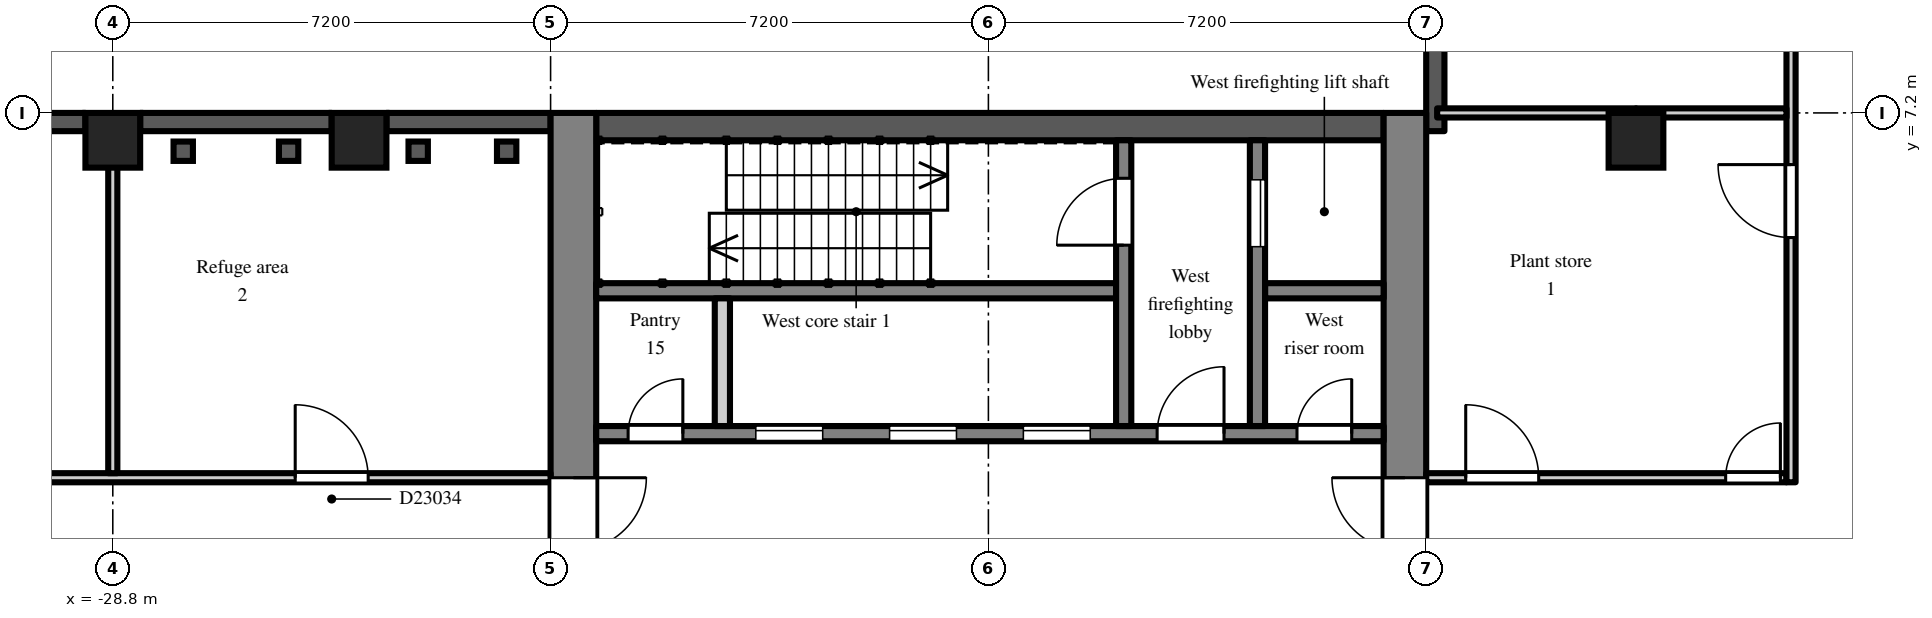
"""IFC4 building model, lengths in metres.
Left out: names, types, materials, properties, quantities, classifications, styles, units other than length and angle.
Written with IfcOpenShell. Run it as: python <this file> out.ifc"""

import sys

from ifc_helpers import new_model, si_unit, direction, frame, frame_2d, origin, origin_2d, place, context, subcontext, project, spatial, rectangle, extrude, element, fill, save


model = new_model("IFC4")
c1 = context("Model", 3, precision=1e-05, world=origin(), true_north=direction((0.0, 1.0)))
c2 = subcontext(c1, "Body", "Model", "MODEL_VIEW")
j1 = project(units=[si_unit("LENGTHUNIT", "METRE"), si_unit("PLANEANGLEUNIT", "RADIAN")], contexts=[c1])
p1 = place(None, origin())
s1 = spatial("IfcSite", under=j1, at=p1, CompositionType="ELEMENT")
p2 = place(p1, origin())
s2 = spatial("IfcBuilding", under=s1, at=p2, CompositionType="ELEMENT")
p3 = place(p2, frame((0.0, 0.0, 162.3)))
s3 = spatial("IfcBuildingStorey", under=s2, at=p3, CompositionType="ELEMENT", Elevation=162.3)
for number, where, z_axis, x_axis in (
    (1, (-28.8, 6.75, 0.0), (0.0, 0.0, 1.0), (1.0, 0.0, 0.0)),
    (2, (-24.75, 6.75, 0.0), (0.0, 0.0, 1.0), (1.0, 0.0, 0.0)),
    (3, (-3.75, 6.75, 0.0), (0.0, 0.0, 1.0), (1.0, 0.0, 0.0)),
):
    element("IfcColumn", number, at=place(p3, frame(where, z_axis=z_axis, x_axis=x_axis)), inside=s3, PredefinedType="COLUMN", context=c2, shape_type="SweptSolid", body=[
        extrude(rectangle(XDim=0.9, YDim=0.9, at=origin_2d()), origin(), (0.0, 0.0, 1.0), 4.2),
    ])
p4 = place(p3, frame((-7.05, 14.4, 0.0), z_axis=(0.0, 0.0, 1.0), x_axis=(0.0, -1.0, 0.0)))
e4 = element("IfcWall", 4, at=p4, inside=s3, PredefinedType="SOLIDWALL", context=c2, shape_type="SweptSolid", body=[
    extrude(rectangle(XDim=7.5, YDim=0.3, at=frame_2d((3.75, 0.0))), origin(), (0.0, 0.0, 1.0), 3.8),
])
p5 = place(p3, frame((-21.6, 7.05, 0.0), z_axis=(0.0, 0.0, 1.0), x_axis=(-1.0, 0.0, 0.0)))
e5 = element("IfcWall", 5, at=p5, inside=s3, PredefinedType="SOLIDWALL", context=c2, shape_type="SweptSolid", body=[
    extrude(rectangle(XDim=2.7, YDim=0.3, at=frame_2d((1.35, 0.0))), origin(), (0.0, 0.0, 1.0), 3.4),
])
p6 = place(p3, frame((-25.2, 7.05, 0.0), z_axis=(0.0, 0.0, 1.0), x_axis=(-1.0, 0.0, 0.0)))
e6 = element("IfcWall", 6, at=p6, inside=s3, PredefinedType="SOLIDWALL", context=c2, shape_type="SweptSolid", body=[
    extrude(rectangle(XDim=3.15, YDim=0.3, at=frame_2d((1.575, 0.0))), origin(), (0.0, 0.0, 1.0), 3.4),
])
p7 = place(p3, frame((-29.25, 7.05, 0.0), z_axis=(0.0, 0.0, 1.0), x_axis=(-1.0, 0.0, 0.0)))
e7 = element("IfcWall", 7, at=p7, inside=s3, PredefinedType="SOLIDWALL", context=c2, shape_type="SweptSolid", body=[
    extrude(rectangle(XDim=6.3, YDim=0.3, at=frame_2d((3.15, 0.0))), origin(), (0.0, 0.0, 1.0), 3.4),
])
p8 = place(p3, frame((-7.55, -7.2, 0.0), z_axis=(0.0, 0.0, 1.0), x_axis=(0.0, 1.0, 0.0)))
e8 = element("IfcWall", 8, at=p8, inside=s3, PredefinedType="SHEAR", context=c2, shape_type="SweptSolid", body=[
    extrude(rectangle(XDim=14.4, YDim=0.7, at=frame_2d((7.2, 0.0))), origin(), (0.0, 0.0, 1.0), 3.8),
])
p9 = place(p8, frame((6.0, 0.0, 0.0)))
e9 = element("IfcOpeningElement", 9, at=p9, cuts=e8, PredefinedType="OPENING", context=c2, shape_type="SweptSolid", body=[
    extrude(rectangle(XDim=2.4, YDim=2.2, at=frame_2d((1.2, 1.1))), frame((0.0, 0.36, 0.0), z_axis=(0.0, -1.0, 0.0), x_axis=(1.0, 0.0, 0.0)), (0.0, 0.0, 1.0), 0.72),
])
p10 = place(p3, frame((-21.225, -7.2, 0.0), z_axis=(0.0, 0.0, 1.0), x_axis=(0.0, 1.0, 0.0)))
e10 = element("IfcWall", 10, at=p10, inside=s3, PredefinedType="SHEAR", context=c2, shape_type="SweptSolid", body=[
    extrude(rectangle(XDim=14.4, YDim=0.75, at=frame_2d((7.2, 0.0))), origin(), (0.0, 0.0, 1.0), 3.8),
])
p11 = place(p10, frame((6.0, 0.0, 0.0)))
e11 = element("IfcOpeningElement", 11, at=p11, cuts=e10, PredefinedType="OPENING", context=c2, shape_type="SweptSolid", body=[
    extrude(rectangle(XDim=2.4, YDim=2.2, at=frame_2d((1.2, 1.1))), frame((0.0, 0.385, 0.0), z_axis=(0.0, -1.0, 0.0), x_axis=(1.0, 0.0, 0.0)), (0.0, 0.0, 1.0), 0.77),
])
p12 = place(p3, frame((-7.9, 6.975, 0.0), z_axis=(0.0, 0.0, 1.0), x_axis=(-1.0, 0.0, 0.0)))
e12 = element("IfcWall", 12, at=p12, inside=s3, PredefinedType="SHEAR", context=c2, shape_type="SweptSolid", body=[
    extrude(rectangle(XDim=12.95, YDim=0.45, at=frame_2d((6.475, 0.0))), origin(), (0.0, 0.0, 1.0), 3.8),
])
p13 = place(p3, frame((-7.9, 1.925, 0.0), z_axis=(0.0, 0.0, 1.0), x_axis=(-1.0, 0.0, 0.0)))
e13 = element("IfcWall", 13, at=p13, inside=s3, PredefinedType="SHEAR", context=c2, shape_type="SweptSolid", body=[
    extrude(rectangle(XDim=12.95, YDim=0.25, at=frame_2d((6.475, 0.0))), origin(), (0.0, 0.0, 1.0), 3.8),
])
p14 = place(p13, frame((4.825, 0.0, 0.0)))
e14 = element("IfcOpeningElement", 14, at=p14, cuts=e13, PredefinedType="OPENING", context=c2, shape_type="SweptSolid", body=[
    extrude(rectangle(XDim=1.1, YDim=2.1, at=frame_2d((0.55, 1.05))), frame((0.0, 0.135, 0.0), z_axis=(0.0, -1.0, 0.0), x_axis=(1.0, 0.0, 0.0)), (0.0, 0.0, 1.0), 0.27),
])
p15 = place(p13, frame((7.025, 0.0, 0.0)))
e15 = element("IfcOpeningElement", 15, at=p15, cuts=e13, PredefinedType="OPENING", context=c2, shape_type="SweptSolid", body=[
    extrude(rectangle(XDim=1.1, YDim=2.1, at=frame_2d((0.55, 1.05))), frame((0.0, 0.135, 0.0), z_axis=(0.0, -1.0, 0.0), x_axis=(1.0, 0.0, 0.0)), (0.0, 0.0, 1.0), 0.27),
])
p16 = place(p13, frame((9.225, 0.0, 0.0)))
e16 = element("IfcOpeningElement", 16, at=p16, cuts=e13, PredefinedType="OPENING", context=c2, shape_type="SweptSolid", body=[
    extrude(rectangle(XDim=1.1, YDim=2.1, at=frame_2d((0.55, 1.05))), frame((0.0, 0.135, 0.0), z_axis=(0.0, -1.0, 0.0), x_axis=(1.0, 0.0, 0.0)), (0.0, 0.0, 1.0), 0.27),
])
p17 = place(p13, frame((0.525, 0.0, 0.0)))
e17 = element("IfcOpeningElement", 17, at=p17, cuts=e13, PredefinedType="OPENING", context=c2, shape_type="SweptSolid", body=[
    extrude(rectangle(XDim=0.9, YDim=2.1, at=frame_2d((0.45, 1.05))), frame((0.0, 0.135, 0.0), z_axis=(0.0, -1.0, 0.0), x_axis=(1.0, 0.0, 0.0)), (0.0, 0.0, 1.0), 0.27),
])
p18 = place(p13, frame((2.625, 0.0, 0.0)))
e18 = element("IfcOpeningElement", 18, at=p18, cuts=e13, PredefinedType="OPENING", context=c2, shape_type="SweptSolid", body=[
    extrude(rectangle(XDim=1.1, YDim=2.1, at=frame_2d((0.55, 1.05))), frame((0.0, 0.135, 0.0), z_axis=(0.0, -1.0, 0.0), x_axis=(1.0, 0.0, 0.0)), (0.0, 0.0, 1.0), 0.27),
])
p19 = place(p13, frame((11.525, 0.0, 0.0)))
e19 = element("IfcOpeningElement", 19, at=p19, cuts=e13, PredefinedType="OPENING", context=c2, shape_type="SweptSolid", body=[
    extrude(rectangle(XDim=0.9, YDim=2.1, at=frame_2d((0.45, 1.05))), frame((0.0, 0.135, 0.0), z_axis=(0.0, -1.0, 0.0), x_axis=(1.0, 0.0, 0.0)), (0.0, 0.0, 1.0), 0.27),
])
p20 = place(p3, frame((-7.9, 4.275, 0.0), z_axis=(0.0, 0.0, 1.0), x_axis=(-1.0, 0.0, 0.0)))
e20 = element("IfcWall", 20, at=p20, inside=s3, PredefinedType="SHEAR", context=c2, shape_type="SweptSolid", body=[
    extrude(rectangle(XDim=1.95, YDim=0.25, at=frame_2d((0.975, 0.0))), origin(), (0.0, 0.0, 1.0), 3.8),
])
p21 = place(p3, frame((-12.3, 4.275, 0.0), z_axis=(0.0, 0.0, 1.0), x_axis=(-1.0, 0.0, 0.0)))
e21 = element("IfcWall", 21, at=p21, inside=s3, PredefinedType="SHEAR", context=c2, shape_type="SweptSolid", body=[
    extrude(rectangle(XDim=8.55, YDim=0.25, at=frame_2d((4.275, 0.0))), origin(), (0.0, 0.0, 1.0), 3.8),
])
p22 = place(p3, frame((-9.975, 2.05, 0.0), z_axis=(0.0, 0.0, 1.0), x_axis=(0.0, 1.0, 0.0)))
e22 = element("IfcWall", 22, at=p22, inside=s3, PredefinedType="SHEAR", context=c2, shape_type="SweptSolid", body=[
    extrude(rectangle(XDim=4.7, YDim=0.25, at=frame_2d((2.35, 0.0))), origin(), (0.0, 0.0, 1.0), 3.8),
])
p23 = place(p22, frame((2.95, 0.0, 0.0)))
e23 = element("IfcOpeningElement", 23, at=p23, cuts=e22, PredefinedType="OPENING", context=c2, shape_type="SweptSolid", body=[
    extrude(rectangle(XDim=1.1, YDim=2.1, at=frame_2d((0.55, 1.05))), frame((0.0, 0.135, 0.0), z_axis=(0.0, -1.0, 0.0), x_axis=(1.0, 0.0, 0.0)), (0.0, 0.0, 1.0), 0.27),
])
p24 = place(p3, frame((-12.175, 2.05, 0.0), z_axis=(0.0, 0.0, 1.0), x_axis=(0.0, 1.0, 0.0)))
e24 = element("IfcWall", 24, at=p24, inside=s3, PredefinedType="SHEAR", context=c2, shape_type="SweptSolid", body=[
    extrude(rectangle(XDim=4.7, YDim=0.25, at=frame_2d((2.35, 0.0))), origin(), (0.0, 0.0, 1.0), 3.8),
])
p25 = place(p24, frame((2.975, 0.0, 0.0)))
e25 = element("IfcOpeningElement", 25, at=p25, cuts=e24, PredefinedType="OPENING", context=c2, shape_type="SweptSolid", body=[
    extrude(rectangle(XDim=1.1, YDim=2.1, at=frame_2d((0.55, 1.05))), frame((0.0, 0.135, 0.0), z_axis=(0.0, -1.0, 0.0), x_axis=(1.0, 0.0, 0.0)), (0.0, 0.0, 1.0), 0.27),
])
p26 = place(p3, frame((-18.775, 2.05, 0.0), z_axis=(0.0, 0.0, 1.0), x_axis=(0.0, 1.0, 0.0)))
e26 = element("IfcWall", 26, at=p26, inside=s3, PredefinedType="PARTITIONING", context=c2, shape_type="SweptSolid", body=[
    extrude(rectangle(XDim=2.1, YDim=0.25, at=frame_2d((1.05, 0.0))), origin(), (0.0, 0.0, 1.0), 3.8),
])
p27 = place(p3, frame((-36.5, 1.2, 0.0), z_axis=(0.0, 0.0, 1.0), x_axis=(1.0, 0.0, 0.0)))
e27 = element("IfcWall", 27, at=p27, inside=s3, PredefinedType="PARTITIONING", context=c2, shape_type="SweptSolid", body=[
    extrude(rectangle(XDim=14.9, YDim=0.15, at=frame_2d((7.45, 0.0))), origin(), (0.0, 0.0, 1.0), 3.8),
])
p28 = place(p27, frame((10.7, 0.0, 0.0)))
e28 = element("IfcOpeningElement", 28, at=p28, cuts=e27, PredefinedType="OPENING", context=c2, shape_type="SweptSolid", body=[
    extrude(rectangle(XDim=1.2, YDim=2.1, at=frame_2d((0.6, 1.05))), frame((0.0, 0.085, 0.0), z_axis=(0.0, -1.0, 0.0), x_axis=(1.0, 0.0, 0.0)), (0.0, 0.0, 1.0), 0.17),
])
p29 = place(p27, frame((2.95, 0.0, 0.0)))
e29 = element("IfcOpeningElement", 29, at=p29, cuts=e27, PredefinedType="OPENING", context=c2, shape_type="SweptSolid", body=[
    extrude(rectangle(XDim=1.8, YDim=2.1, at=frame_2d((0.9, 1.05))), frame((0.0, 0.085, 0.0), z_axis=(0.0, -1.0, 0.0), x_axis=(1.0, 0.0, 0.0)), (0.0, 0.0, 1.0), 0.17),
])
p30 = place(p3, frame((-28.8, 1.275, 0.0), z_axis=(0.0, 0.0, 1.0), x_axis=(0.0, 1.0, 0.0)))
e30 = element("IfcWall", 30, at=p30, inside=s3, PredefinedType="PARTITIONING", context=c2, shape_type="SweptSolid", body=[
    extrude(rectangle(XDim=5.625, YDim=0.15, at=frame_2d((2.812, 0.0))), origin(), (0.0, 0.0, 1.0), 3.8),
])
p31 = place(p3, frame((-7.2, 1.2, 0.0), z_axis=(0.0, 0.0, 1.0), x_axis=(1.0, 0.0, 0.0)))
e31 = element("IfcWall", 31, at=p31, inside=s3, PredefinedType="PARTITIONING", context=c2, shape_type="SweptSolid", body=[
    extrude(rectangle(XDim=5.925, YDim=0.15, at=frame_2d((2.962, 0.0))), origin(), (0.0, 0.0, 1.0), 3.8),
])
p32 = place(p31, frame((0.65, 0.0, 0.0)))
e32 = element("IfcOpeningElement", 32, at=p32, cuts=e31, PredefinedType="OPENING", context=c2, shape_type="SweptSolid", body=[
    extrude(rectangle(XDim=1.2, YDim=2.1, at=frame_2d((0.6, 1.05))), frame((0.0, 0.085, 0.0), z_axis=(0.0, -1.0, 0.0), x_axis=(1.0, 0.0, 0.0)), (0.0, 0.0, 1.0), 0.17),
])
p33 = place(p31, frame((4.925, 0.0, 0.0)))
e33 = element("IfcOpeningElement", 33, at=p33, cuts=e31, PredefinedType="OPENING", context=c2, shape_type="SweptSolid", body=[
    extrude(rectangle(XDim=0.9, YDim=2.1, at=frame_2d((0.45, 1.05))), frame((0.0, 0.085, 0.0), z_axis=(0.0, -1.0, 0.0), x_axis=(1.0, 0.0, 0.0)), (0.0, 0.0, 1.0), 0.17),
])
p34 = place(p3, frame((-7.02, 7.2, 0.0), z_axis=(0.0, 0.0, 1.0), x_axis=(1.0, 0.0, 0.0)))
e34 = element("IfcWall", 34, at=p34, inside=s3, PredefinedType="PARTITIONING", context=c2, shape_type="SweptSolid", body=[
    extrude(rectangle(XDim=3.27, YDim=0.15, at=frame_2d((1.635, 0.0))), origin(), (0.0, 0.0, 1.0), 3.4),
])
p35 = place(p3, frame((-1.2, 1.125, 0.0), z_axis=(0.0, 0.0, 1.0), x_axis=(0.0, 1.0, 0.0)))
e35 = element("IfcWall", 35, at=p35, inside=s3, PredefinedType="PARTITIONING", context=c2, shape_type="SweptSolid", body=[
    extrude(rectangle(XDim=20.295, YDim=0.15, at=frame_2d((10.147, 0.0))), origin(), (0.0, 0.0, 1.0), 3.8),
])
p36 = place(p35, frame((4.025, 0.0, 0.0)))
e36 = element("IfcOpeningElement", 36, at=p36, cuts=e35, PredefinedType="OPENING", context=c2, shape_type="SweptSolid", body=[
    extrude(rectangle(XDim=1.2, YDim=2.1, at=frame_2d((0.6, 1.05))), frame((0.0, 0.085, 0.0), z_axis=(0.0, -1.0, 0.0), x_axis=(1.0, 0.0, 0.0)), (0.0, 0.0, 1.0), 0.17),
])
p37 = place(p35, frame((8.775, 0.0, 0.0)))
e37 = element("IfcOpeningElement", 37, at=p37, cuts=e35, PredefinedType="OPENING", context=c2, shape_type="SweptSolid", body=[
    extrude(rectangle(XDim=1.8, YDim=2.1, at=frame_2d((0.9, 1.05))), frame((0.0, 0.085, 0.0), z_axis=(0.0, -1.0, 0.0), x_axis=(1.0, 0.0, 0.0)), (0.0, 0.0, 1.0), 0.17),
])
p38 = place(p35, frame((15.825, 0.0, 0.0)))
e38 = element("IfcOpeningElement", 38, at=p38, cuts=e35, PredefinedType="OPENING", context=c2, shape_type="SweptSolid", body=[
    extrude(rectangle(XDim=1.8, YDim=2.1, at=frame_2d((0.9, 1.05))), frame((0.0, 0.085, 0.0), z_axis=(0.0, -1.0, 0.0), x_axis=(1.0, 0.0, 0.0)), (0.0, 0.0, 1.0), 0.17),
])
p39 = place(p35, frame((18.125, 0.0, 0.0)))
e39 = element("IfcOpeningElement", 39, at=p39, cuts=e35, PredefinedType="OPENING", context=c2, shape_type="SweptSolid", body=[
    extrude(rectangle(XDim=1.2, YDim=2.1, at=frame_2d((0.6, 1.05))), frame((0.0, 0.085, 0.0), z_axis=(0.0, -1.0, 0.0), x_axis=(1.0, 0.0, 0.0)), (0.0, 0.0, 1.0), 0.17),
])
p40 = place(p3, frame((-3.75, 7.2, 0.0), z_axis=(0.0, 0.0, 1.0), x_axis=(1.0, 0.0, 0.0)))
e40 = element("IfcWall", 40, at=p40, inside=s3, PredefinedType="PARTITIONING", context=c2, shape_type="SweptSolid", body=[
    extrude(rectangle(XDim=2.475, YDim=0.15, at=frame_2d((1.238, 0.0))), origin(), (0.0, 0.0, 1.0), 3.8),
])
p41 = place(p14, origin())
e41 = element("IfcDoor", 41, at=p41, inside=s3, OperationType="SLIDING_TO_LEFT", PredefinedType="DOOR", context=c2, shape_type="SweptSolid", body=[
    extrude(rectangle(XDim=1.1, YDim=2.1, at=frame_2d((0.55, 1.05))), frame((0.0, 0.025, 0.0), z_axis=(0.0, -1.0, 0.0), x_axis=(1.0, 0.0, 0.0)), (0.0, 0.0, 1.0), 0.05),
])
fill(e14, e41)
p42 = place(p15, origin())
e42 = element("IfcDoor", 42, at=p42, inside=s3, OperationType="SLIDING_TO_LEFT", PredefinedType="DOOR", context=c2, shape_type="SweptSolid", body=[
    extrude(rectangle(XDim=1.1, YDim=2.1, at=frame_2d((0.55, 1.05))), frame((0.0, 0.025, 0.0), z_axis=(0.0, -1.0, 0.0), x_axis=(1.0, 0.0, 0.0)), (0.0, 0.0, 1.0), 0.05),
])
fill(e15, e42)
p43 = place(p16, origin())
e43 = element("IfcDoor", 43, at=p43, inside=s3, OperationType="SLIDING_TO_LEFT", PredefinedType="DOOR", context=c2, shape_type="SweptSolid", body=[
    extrude(rectangle(XDim=1.1, YDim=2.1, at=frame_2d((0.55, 1.05))), frame((0.0, 0.025, 0.0), z_axis=(0.0, -1.0, 0.0), x_axis=(1.0, 0.0, 0.0)), (0.0, 0.0, 1.0), 0.05),
])
fill(e16, e43)
p44 = place(p23, origin())
e44 = element("IfcDoor", 44, at=p44, inside=s3, OperationType="SLIDING_TO_LEFT", PredefinedType="DOOR", context=c2, shape_type="SweptSolid", body=[
    extrude(rectangle(XDim=1.1, YDim=2.1, at=frame_2d((0.55, 1.05))), frame((0.0, 0.025, 0.0), z_axis=(0.0, -1.0, 0.0), x_axis=(1.0, 0.0, 0.0)), (0.0, 0.0, 1.0), 0.05),
])
fill(e23, e44)
p45 = place(p25, origin())
e45 = element("IfcDoor", 45, at=p45, inside=s3, OperationType="SINGLE_SWING_LEFT", PredefinedType="DOOR", context=c2, shape_type="SweptSolid", body=[
    extrude(rectangle(XDim=1.1, YDim=2.1, at=frame_2d((0.55, 1.05))), frame((0.0, 0.025, 0.0), z_axis=(0.0, -1.0, 0.0), x_axis=(1.0, 0.0, 0.0)), (0.0, 0.0, 1.0), 0.05),
])
fill(e25, e45)
p46 = place(p17, frame((0.9, 0.0, 0.0), z_axis=(0.0, 0.0, 1.0), x_axis=(-1.0, 0.0, 0.0)))
e46 = element("IfcDoor", 46, at=p46, inside=s3, OperationType="SINGLE_SWING_RIGHT", PredefinedType="DOOR", context=c2, shape_type="SweptSolid", body=[
    extrude(rectangle(XDim=0.9, YDim=2.1, at=frame_2d((0.45, 1.05))), frame((0.0, 0.025, 0.0), z_axis=(0.0, -1.0, 0.0), x_axis=(1.0, 0.0, 0.0)), (0.0, 0.0, 1.0), 0.05),
])
fill(e17, e46)
p47 = place(p18, frame((1.1, 0.0, 0.0), z_axis=(0.0, 0.0, 1.0), x_axis=(-1.0, 0.0, 0.0)))
e47 = element("IfcDoor", 47, at=p47, inside=s3, OperationType="SINGLE_SWING_RIGHT", PredefinedType="DOOR", context=c2, shape_type="SweptSolid", body=[
    extrude(rectangle(XDim=1.1, YDim=2.1, at=frame_2d((0.55, 1.05))), frame((0.0, 0.025, 0.0), z_axis=(0.0, -1.0, 0.0), x_axis=(1.0, 0.0, 0.0)), (0.0, 0.0, 1.0), 0.05),
])
fill(e18, e47)
p48 = place(p9, origin())
e48 = element("IfcDoor", 48, at=p48, inside=s3, OperationType="DOUBLE_DOOR_DOUBLE_SWING", PredefinedType="DOOR", context=c2, shape_type="SweptSolid", body=[
    extrude(rectangle(XDim=2.4, YDim=2.2, at=frame_2d((1.2, 1.1))), frame((0.0, 0.025, 0.0), z_axis=(0.0, -1.0, 0.0), x_axis=(1.0, 0.0, 0.0)), (0.0, 0.0, 1.0), 0.05),
])
fill(e9, e48)
p49 = place(p11, frame((2.4, 0.0, 0.0), z_axis=(0.0, 0.0, 1.0), x_axis=(-1.0, 0.0, 0.0)))
e49 = element("IfcDoor", 49, at=p49, inside=s3, OperationType="DOUBLE_DOOR_DOUBLE_SWING", PredefinedType="DOOR", context=c2, shape_type="SweptSolid", body=[
    extrude(rectangle(XDim=2.4, YDim=2.2, at=frame_2d((1.2, 1.1))), frame((0.0, 0.025, 0.0), z_axis=(0.0, -1.0, 0.0), x_axis=(1.0, 0.0, 0.0)), (0.0, 0.0, 1.0), 0.05),
])
fill(e11, e49)
p50 = place(p19, frame((0.9, 0.0, 0.0), z_axis=(0.0, 0.0, 1.0), x_axis=(-1.0, 0.0, 0.0)))
e50 = element("IfcDoor", 50, at=p50, inside=s3, OperationType="SINGLE_SWING_RIGHT", PredefinedType="DOOR", context=c2, shape_type="SweptSolid", body=[
    extrude(rectangle(XDim=0.9, YDim=2.1, at=frame_2d((0.45, 1.05))), frame((0.0, 0.025, 0.0), z_axis=(0.0, -1.0, 0.0), x_axis=(1.0, 0.0, 0.0)), (0.0, 0.0, 1.0), 0.05),
])
fill(e19, e50)
p51 = place(p32, origin())
e51 = element("IfcDoor", 51, at=p51, inside=s3, OperationType="SINGLE_SWING_LEFT", PredefinedType="DOOR", context=c2, shape_type="SweptSolid", body=[
    extrude(rectangle(XDim=1.2, YDim=2.1, at=frame_2d((0.6, 1.05))), frame((0.0, 0.025, 0.0), z_axis=(0.0, -1.0, 0.0), x_axis=(1.0, 0.0, 0.0)), (0.0, 0.0, 1.0), 0.05),
])
fill(e32, e51)
p52 = place(p33, origin())
e52 = element("IfcDoor", 52, at=p52, inside=s3, OperationType="SINGLE_SWING_RIGHT", PredefinedType="DOOR", context=c2, shape_type="SweptSolid", body=[
    extrude(rectangle(XDim=0.9, YDim=2.1, at=frame_2d((0.45, 1.05))), frame((0.0, 0.025, 0.0), z_axis=(0.0, -1.0, 0.0), x_axis=(1.0, 0.0, 0.0)), (0.0, 0.0, 1.0), 0.05),
])
fill(e33, e52)
p53 = place(p36, origin())
e53 = element("IfcDoor", 53, at=p53, inside=s3, OperationType="SINGLE_SWING_RIGHT", PredefinedType="DOOR", context=c2, shape_type="SweptSolid", body=[
    extrude(rectangle(XDim=1.2, YDim=2.1, at=frame_2d((0.6, 1.05))), frame((0.0, 0.025, 0.0), z_axis=(0.0, -1.0, 0.0), x_axis=(1.0, 0.0, 0.0)), (0.0, 0.0, 1.0), 0.05),
])
fill(e36, e53)
p54 = place(p28, origin())
e54 = element("IfcDoor", 54, at=p54, inside=s3, OperationType="SINGLE_SWING_LEFT", PredefinedType="DOOR", context=c2, shape_type="SweptSolid", body=[
    extrude(rectangle(XDim=1.2, YDim=2.1, at=frame_2d((0.6, 1.05))), frame((0.0, 0.025, 0.0), z_axis=(0.0, -1.0, 0.0), x_axis=(1.0, 0.0, 0.0)), (0.0, 0.0, 1.0), 0.05),
])
fill(e28, e54)
save(model, sys.argv[1])
